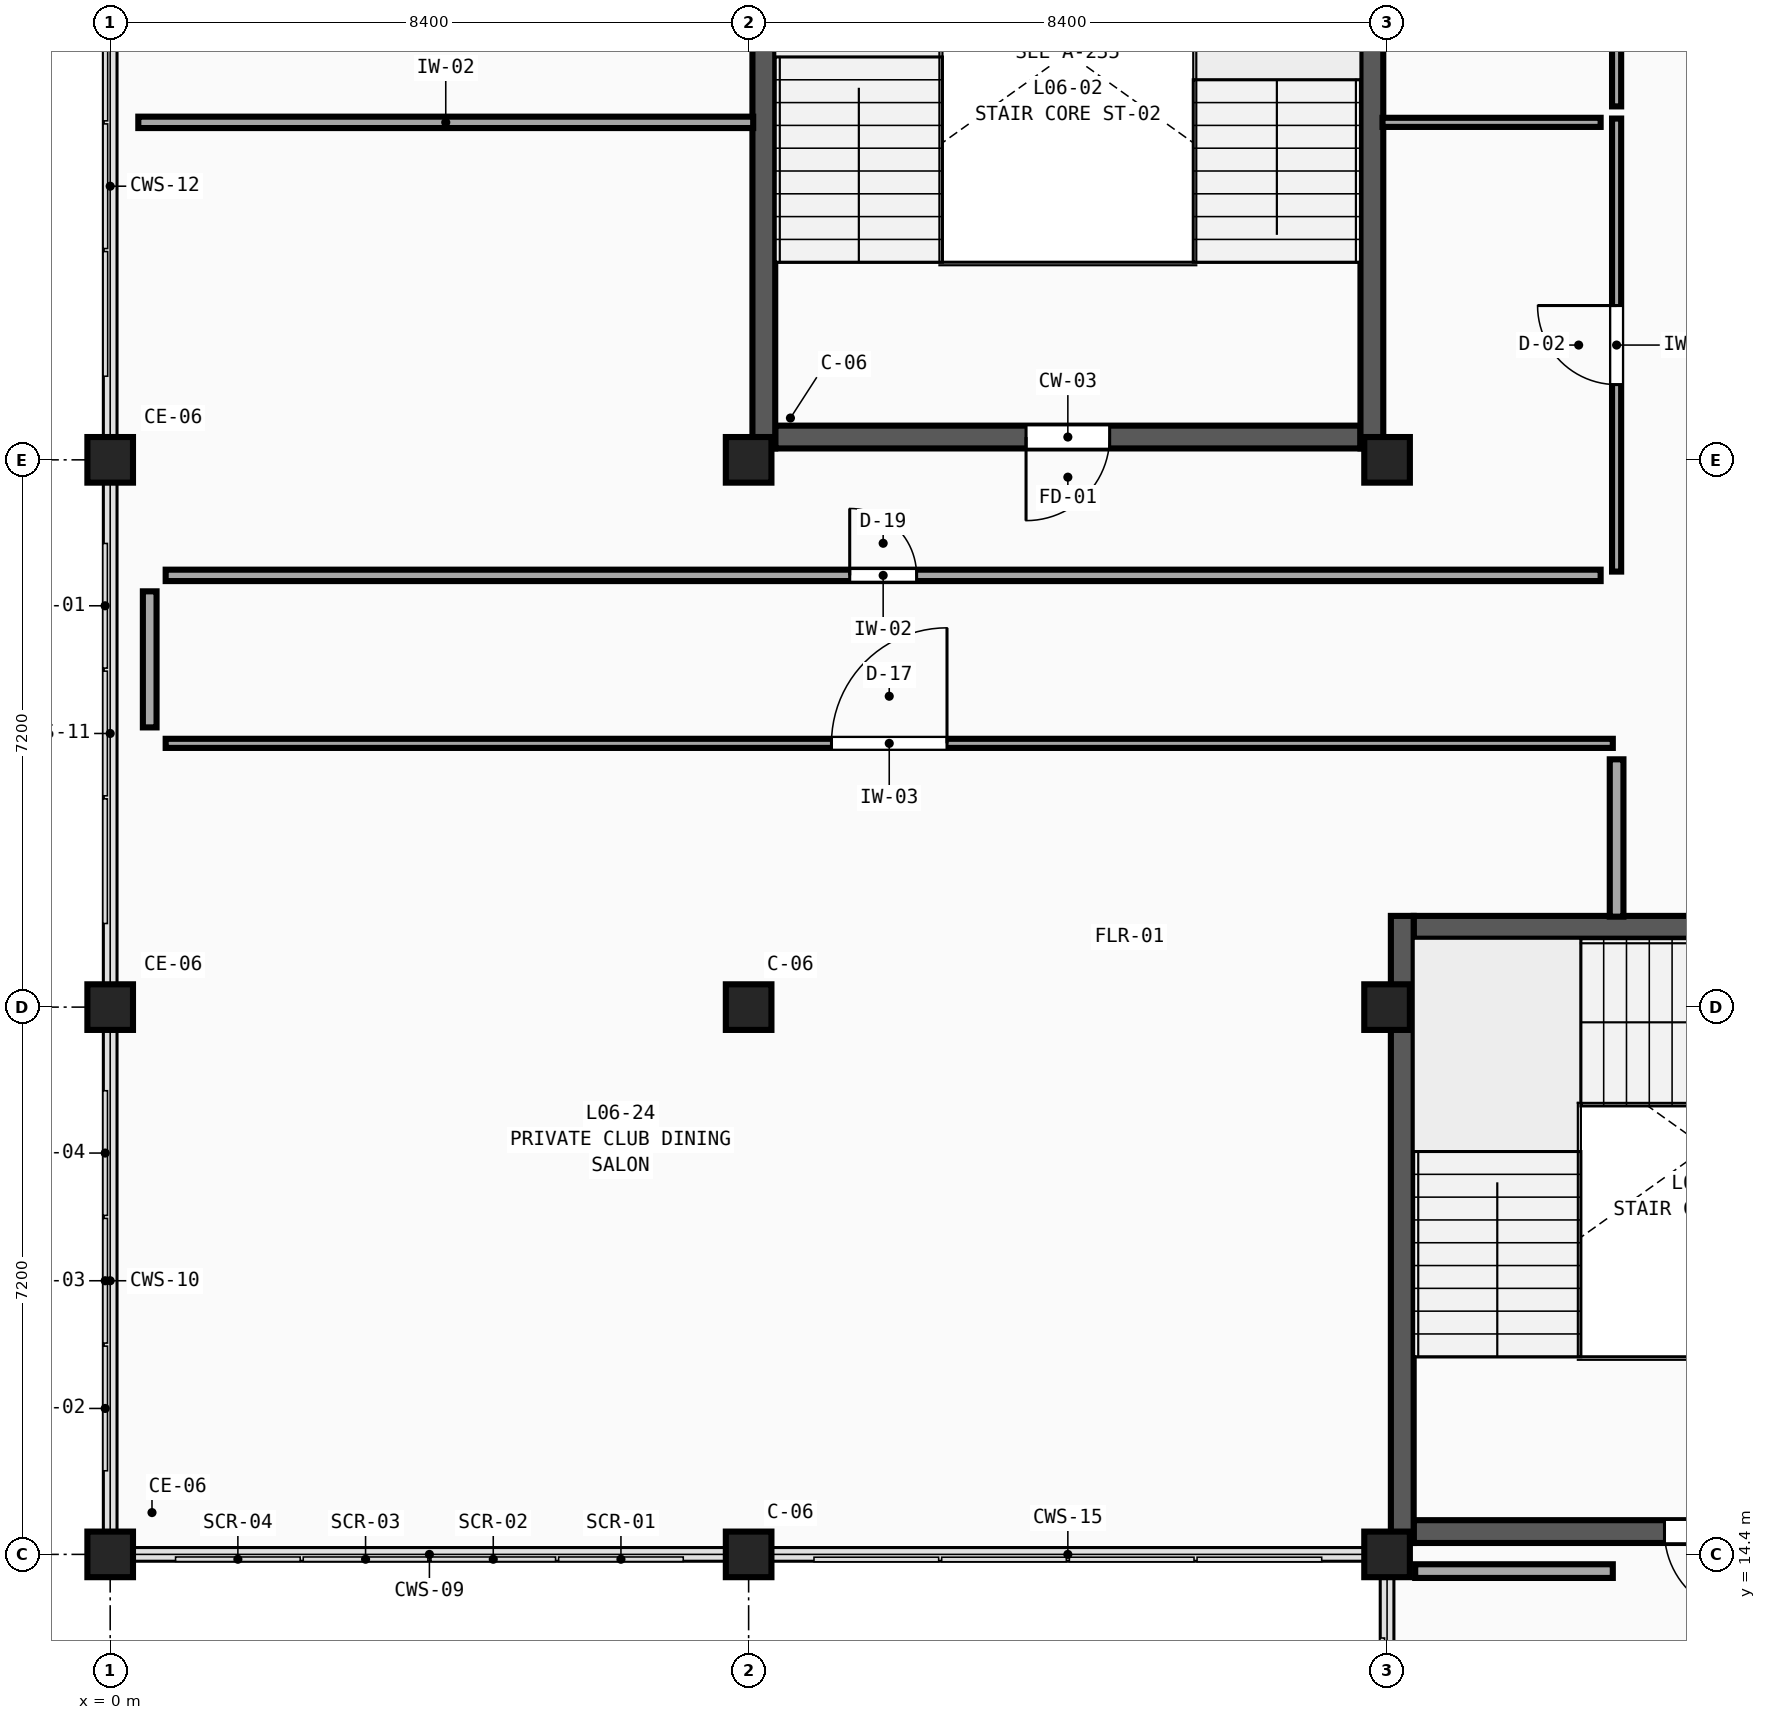
"""IFC4 building model, lengths in metres.
Left out: names, types, materials, properties, quantities, classifications, styles, units other than length and angle.
Written with IfcOpenShell. Run it as: python <this file> out.ifc"""

import sys

from ifc_helpers import new_model, si_unit, direction, frame, frame_2d, origin, origin_2d, place, context, subcontext, project, spatial, rectangle, extrude, element, fill, save


model = new_model("IFC4")
c1 = context("Model", 3, precision=1e-05, world=origin(), true_north=direction((0.0, 1.0)))
c2 = subcontext(c1, "Body", "Model", "MODEL_VIEW")
j1 = project(units=[si_unit("LENGTHUNIT", "METRE"), si_unit("PLANEANGLEUNIT", "RADIAN")], contexts=[c1])
p1 = place(None, origin())
s1 = spatial("IfcSite", under=j1, at=p1, CompositionType="ELEMENT")
p2 = place(p1, origin())
s2 = spatial("IfcBuilding", under=s1, at=p2, CompositionType="ELEMENT")
p3 = place(p2, frame((0.0, 0.0, 27.9)))
s3 = spatial("IfcBuildingStorey", under=s2, at=p3, CompositionType="ELEMENT", Elevation=27.9)
for number, where, z_axis, x_axis in (
    (1, (0.0, 14.4, 0.0), (0.0, 0.0, 1.0), (1.0, 0.0, 0.0)),
    (2, (0.0, 21.6, 0.0), (0.0, 0.0, 1.0), (1.0, 0.0, 0.0)),
    (3, (0.0, 28.8, 0.0), (0.0, 0.0, 1.0), (1.0, 0.0, 0.0)),
    (4, (8.4, 14.4, 0.0), (0.0, 0.0, 1.0), (1.0, 0.0, 0.0)),
    (5, (8.4, 21.6, 0.0), (0.0, 0.0, 1.0), (1.0, 0.0, 0.0)),
    (6, (8.4, 28.8, 0.0), (0.0, 0.0, 1.0), (1.0, 0.0, 0.0)),
    (7, (16.8, 14.4, 0.0), (0.0, 0.0, 1.0), (1.0, 0.0, 0.0)),
    (8, (16.8, 21.6, 0.0), (0.0, 0.0, 1.0), (1.0, 0.0, 0.0)),
    (9, (16.8, 28.8, 0.0), (0.0, 0.0, 1.0), (1.0, 0.0, 0.0)),
):
    element("IfcColumn", number, at=place(p3, frame(where, z_axis=z_axis, x_axis=x_axis)), inside=s3, PredefinedType="COLUMN", context=c2, shape_type="SweptSolid", body=[
        extrude(rectangle(XDim=0.6, YDim=0.6, at=origin_2d()), origin(), (0.0, 0.0, 1.0), 4.2),
    ])
p4 = place(p3, frame((24.85, 14.7, 0.0), z_axis=(0.0, 0.0, 1.0), x_axis=(-1.0, 0.0, 0.0)))
e10 = element("IfcWall", 10, at=p4, inside=s3, PredefinedType="SHEAR", context=c2, shape_type="SweptSolid", body=[
    extrude(rectangle(XDim=7.7, YDim=0.3, at=frame_2d((3.85, 0.0))), origin(), (0.0, 0.0, 1.0), 4.2),
])
p5 = place(p4, frame((3.3, 0.0, 0.0)))
e11 = element("IfcOpeningElement", 11, at=p5, cuts=e10, PredefinedType="OPENING", context=c2, shape_type="SweptSolid", body=[
    extrude(rectangle(XDim=1.1, YDim=2.2, at=frame_2d((0.55, 1.1))), frame((0.0, 0.17, 0.0), z_axis=(0.0, -1.0, 0.0), x_axis=(1.0, 0.0, 0.0)), (0.0, 0.0, 1.0), 0.34),
])
p6 = place(p3, frame((17.15, 22.65, 0.0), z_axis=(0.0, 0.0, 1.0), x_axis=(1.0, 0.0, 0.0)))
e12 = element("IfcWall", 12, at=p6, inside=s3, PredefinedType="SHEAR", context=c2, shape_type="SweptSolid", body=[
    extrude(rectangle(XDim=7.7, YDim=0.3, at=frame_2d((3.85, 0.0))), origin(), (0.0, 0.0, 1.0), 4.2),
])
p7 = place(p3, frame((17.0, 22.8, 0.0), z_axis=(0.0, 0.0, 1.0), x_axis=(0.0, -1.0, 0.0)))
e13 = element("IfcWall", 13, at=p7, inside=s3, PredefinedType="SHEAR", context=c2, shape_type="SweptSolid", body=[
    extrude(rectangle(XDim=8.25, YDim=0.3, at=frame_2d((4.125, 0.0))), origin(), (0.0, 0.0, 1.0), 4.2),
])
p8 = place(p3, frame((16.45, 29.1, 0.0), z_axis=(0.0, 0.0, 1.0), x_axis=(-1.0, 0.0, 0.0)))
e14 = element("IfcWall", 14, at=p8, inside=s3, PredefinedType="SHEAR", context=c2, shape_type="SweptSolid", body=[
    extrude(rectangle(XDim=7.7, YDim=0.3, at=frame_2d((3.85, 0.0))), origin(), (0.0, 0.0, 1.0), 4.2),
])
p9 = place(p8, frame((3.3, 0.0, 0.0)))
e15 = element("IfcOpeningElement", 15, at=p9, cuts=e14, PredefinedType="OPENING", context=c2, shape_type="SweptSolid", body=[
    extrude(rectangle(XDim=1.1, YDim=2.2, at=frame_2d((0.55, 1.1))), frame((0.0, 0.17, 0.0), z_axis=(0.0, -1.0, 0.0), x_axis=(1.0, 0.0, 0.0)), (0.0, 0.0, 1.0), 0.34),
])
for number, where, z_axis, x_axis in (
    (16, (8.6, 37.2, 0.0), (0.0, 0.0, 1.0), (0.0, -1.0, 0.0)),
    (17, (16.6, 28.95, 0.0), (0.0, 0.0, 1.0), (0.0, 1.0, 0.0)),
):
    element("IfcWall", number, at=place(p3, frame(where, z_axis=z_axis, x_axis=x_axis)), inside=s3, PredefinedType="SHEAR", context=c2, shape_type="SweptSolid", body=[
        extrude(rectangle(XDim=8.25, YDim=0.3, at=frame_2d((4.125, 0.0))), origin(), (0.0, 0.0, 1.0), 4.2),
    ])
p10 = place(p3, frame((0.73, 25.07, 0.0), z_axis=(0.0, 0.0, 1.0), x_axis=(1.0, 0.0, 0.0)))
e18 = element("IfcWall", 18, at=p10, inside=s3, PredefinedType="PARTITIONING", context=c2, shape_type="SweptSolid", body=[
    extrude(rectangle(XDim=19.04, YDim=0.12, at=frame_2d((9.52, 0.0))), origin(), (0.0, 0.0, 1.0), 3.91),
])
p11 = place(p10, frame((8.76, 0.0, 0.0)))
e19 = element("IfcOpeningElement", 19, at=p11, cuts=e18, PredefinedType="OPENING", context=c2, shape_type="SweptSolid", body=[
    extrude(rectangle(XDim=1.52, YDim=2.21, at=frame_2d((0.76, 1.105))), frame((0.0, 0.08, 0.0), z_axis=(0.0, -1.0, 0.0), x_axis=(1.0, 0.0, 0.0)), (0.0, 0.0, 1.0), 0.16),
])
p12 = place(p3, frame((0.73, 27.28, 0.0), z_axis=(0.0, 0.0, 1.0), x_axis=(1.0, 0.0, 0.0)))
e20 = element("IfcWall", 20, at=p12, inside=s3, PredefinedType="PARTITIONING", context=c2, shape_type="SweptSolid", body=[
    extrude(rectangle(XDim=18.88, YDim=0.15, at=frame_2d((9.44, 0.0))), origin(), (0.0, 0.0, 1.0), 3.91),
])
p13 = place(p12, frame((9.0, 0.0, 0.0)))
e21 = element("IfcOpeningElement", 21, at=p13, cuts=e20, PredefinedType="OPENING", context=c2, shape_type="SweptSolid", body=[
    extrude(rectangle(XDim=0.88, YDim=2.29, at=frame_2d((0.44, 1.145))), frame((0.0, 0.095, 0.0), z_axis=(0.0, -1.0, 0.0), x_axis=(1.0, 0.0, 0.0)), (0.0, 0.0, 1.0), 0.19),
])
p14 = place(p3, frame((19.82, 27.33, 0.0), z_axis=(0.0, 0.0, 1.0), x_axis=(0.0, 1.0, 0.0)))
e22 = element("IfcWall", 22, at=p14, inside=s3, PredefinedType="PARTITIONING", context=c2, shape_type="SweptSolid", body=[
    extrude(rectangle(XDim=5.96, YDim=0.12, at=frame_2d((2.98, 0.0))), origin(), (0.0, 0.0, 1.0), 3.91),
])
p15 = place(p14, frame((2.46, 0.0, 0.0)))
e23 = element("IfcOpeningElement", 23, at=p15, cuts=e22, PredefinedType="OPENING", context=c2, shape_type="SweptSolid", body=[
    extrude(rectangle(XDim=1.04, YDim=2.05, at=frame_2d((0.52, 1.025))), frame((0.0, 0.08, 0.0), z_axis=(0.0, -1.0, 0.0), x_axis=(1.0, 0.0, 0.0)), (0.0, 0.0, 1.0), 0.16),
])
p16 = place(p3, frame((19.82, 33.45, 0.0), z_axis=(0.0, 0.0, 1.0), x_axis=(0.0, 1.0, 0.0)))
e24 = element("IfcWall", 24, at=p16, inside=s3, PredefinedType="PARTITIONING", context=c2, shape_type="SweptSolid", body=[
    extrude(rectangle(XDim=3.35, YDim=0.12, at=frame_2d((1.675, 0.0))), origin(), (0.0, 0.0, 1.0), 3.91),
])
p17 = place(p16, frame((1.155, 0.0, 0.0)))
e25 = element("IfcOpeningElement", 25, at=p17, cuts=e24, PredefinedType="OPENING", context=c2, shape_type="SweptSolid", body=[
    extrude(rectangle(XDim=1.04, YDim=2.21, at=frame_2d((0.52, 1.105))), frame((0.0, 0.08, 0.0), z_axis=(0.0, -1.0, 0.0), x_axis=(1.0, 0.0, 0.0)), (0.0, 0.0, 1.0), 0.16),
])
p18 = place(p3, frame((17.17, 14.18, 0.0), z_axis=(0.0, 0.0, 1.0), x_axis=(1.0, 0.0, 0.0)))
e26 = element("IfcWall", 26, at=p18, inside=s3, PredefinedType="PARTITIONING", context=c2, shape_type="SweptSolid", body=[
    extrude(rectangle(XDim=2.6, YDim=0.18, at=frame_2d((1.3, 0.0))), origin(), (0.0, 0.0, 1.0), 3.46),
])
p19 = place(p3, frame((19.82, 22.79, 0.0), z_axis=(0.0, 0.0, 1.0), x_axis=(0.0, 1.0, 0.0)))
e27 = element("IfcWall", 27, at=p19, inside=s3, PredefinedType="PARTITIONING", context=c2, shape_type="SweptSolid", body=[
    extrude(rectangle(XDim=2.07, YDim=0.18, at=frame_2d((1.035, 0.0))), origin(), (0.0, 0.0, 1.0), 3.91),
])
p20 = place(p3, frame((0.52, 25.28, 0.0), z_axis=(0.0, 0.0, 1.0), x_axis=(0.0, 1.0, 0.0)))
e28 = element("IfcWall", 28, at=p20, inside=s3, PredefinedType="PARTITIONING", context=c2, shape_type="SweptSolid", body=[
    extrude(rectangle(XDim=1.79, YDim=0.18, at=frame_2d((0.895, 0.0))), origin(), (0.0, 0.0, 1.0), 3.36),
])
p21 = place(p3, frame((0.37, 33.24, 0.0), z_axis=(0.0, 0.0, 1.0), x_axis=(1.0, 0.0, 0.0)))
e29 = element("IfcWall", 29, at=p21, inside=s3, PredefinedType="PARTITIONING", context=c2, shape_type="SweptSolid", body=[
    extrude(rectangle(XDim=8.09, YDim=0.15, at=frame_2d((4.045, 0.0))), origin(), (0.0, 0.0, 1.0), 3.91),
])
p22 = place(p3, frame((16.74, 33.24, 0.0), z_axis=(0.0, 0.0, 1.0), x_axis=(1.0, 0.0, 0.0)))
e30 = element("IfcWall", 30, at=p22, inside=s3, PredefinedType="PARTITIONING", context=c2, shape_type="SweptSolid", body=[
    extrude(rectangle(XDim=2.87, YDim=0.12, at=frame_2d((1.435, 0.0))), origin(), (0.0, 0.0, 1.0), 3.91),
])
p23 = place(p5, origin())
e31 = element("IfcDoor", 31, at=p23, inside=s3, OperationType="SINGLE_SWING_LEFT", PredefinedType="DOOR", context=c2, shape_type="SweptSolid", body=[
    extrude(rectangle(XDim=1.1, YDim=2.2, at=frame_2d((0.55, 1.1))), frame((0.0, 0.025, 0.0), z_axis=(0.0, -1.0, 0.0), x_axis=(1.0, 0.0, 0.0)), (0.0, 0.0, 1.0), 0.05),
])
fill(e11, e31)
p24 = place(p9, origin())
e32 = element("IfcDoor", 32, at=p24, inside=s3, OperationType="SINGLE_SWING_RIGHT", PredefinedType="DOOR", context=c2, shape_type="SweptSolid", body=[
    extrude(rectangle(XDim=1.1, YDim=2.2, at=frame_2d((0.55, 1.1))), frame((0.0, 0.025, 0.0), z_axis=(0.0, -1.0, 0.0), x_axis=(1.0, 0.0, 0.0)), (0.0, 0.0, 1.0), 0.05),
])
fill(e15, e32)
p25 = place(p11, origin())
e33 = element("IfcDoor", 33, at=p25, inside=s3, OperationType="SINGLE_SWING_RIGHT", PredefinedType="DOOR", context=c2, shape_type="SweptSolid", body=[
    extrude(rectangle(XDim=1.52, YDim=2.21, at=frame_2d((0.76, 1.105))), frame((0.0, 0.025, 0.0), z_axis=(0.0, -1.0, 0.0), x_axis=(1.0, 0.0, 0.0)), (0.0, 0.0, 1.0), 0.05),
])
fill(e19, e33)
p26 = place(p13, origin())
e34 = element("IfcDoor", 34, at=p26, inside=s3, OperationType="SINGLE_SWING_LEFT", PredefinedType="DOOR", context=c2, shape_type="SweptSolid", body=[
    extrude(rectangle(XDim=0.88, YDim=2.29, at=frame_2d((0.44, 1.145))), frame((0.0, 0.025, 0.0), z_axis=(0.0, -1.0, 0.0), x_axis=(1.0, 0.0, 0.0)), (0.0, 0.0, 1.0), 0.05),
])
fill(e21, e34)
p27 = place(p15, origin())
e35 = element("IfcDoor", 35, at=p27, inside=s3, OperationType="SINGLE_SWING_RIGHT", PredefinedType="DOOR", context=c2, shape_type="SweptSolid", body=[
    extrude(rectangle(XDim=1.04, YDim=2.05, at=frame_2d((0.52, 1.025))), frame((0.0, 0.025, 0.0), z_axis=(0.0, -1.0, 0.0), x_axis=(1.0, 0.0, 0.0)), (0.0, 0.0, 1.0), 0.05),
])
fill(e23, e35)
save(model, sys.argv[1])
